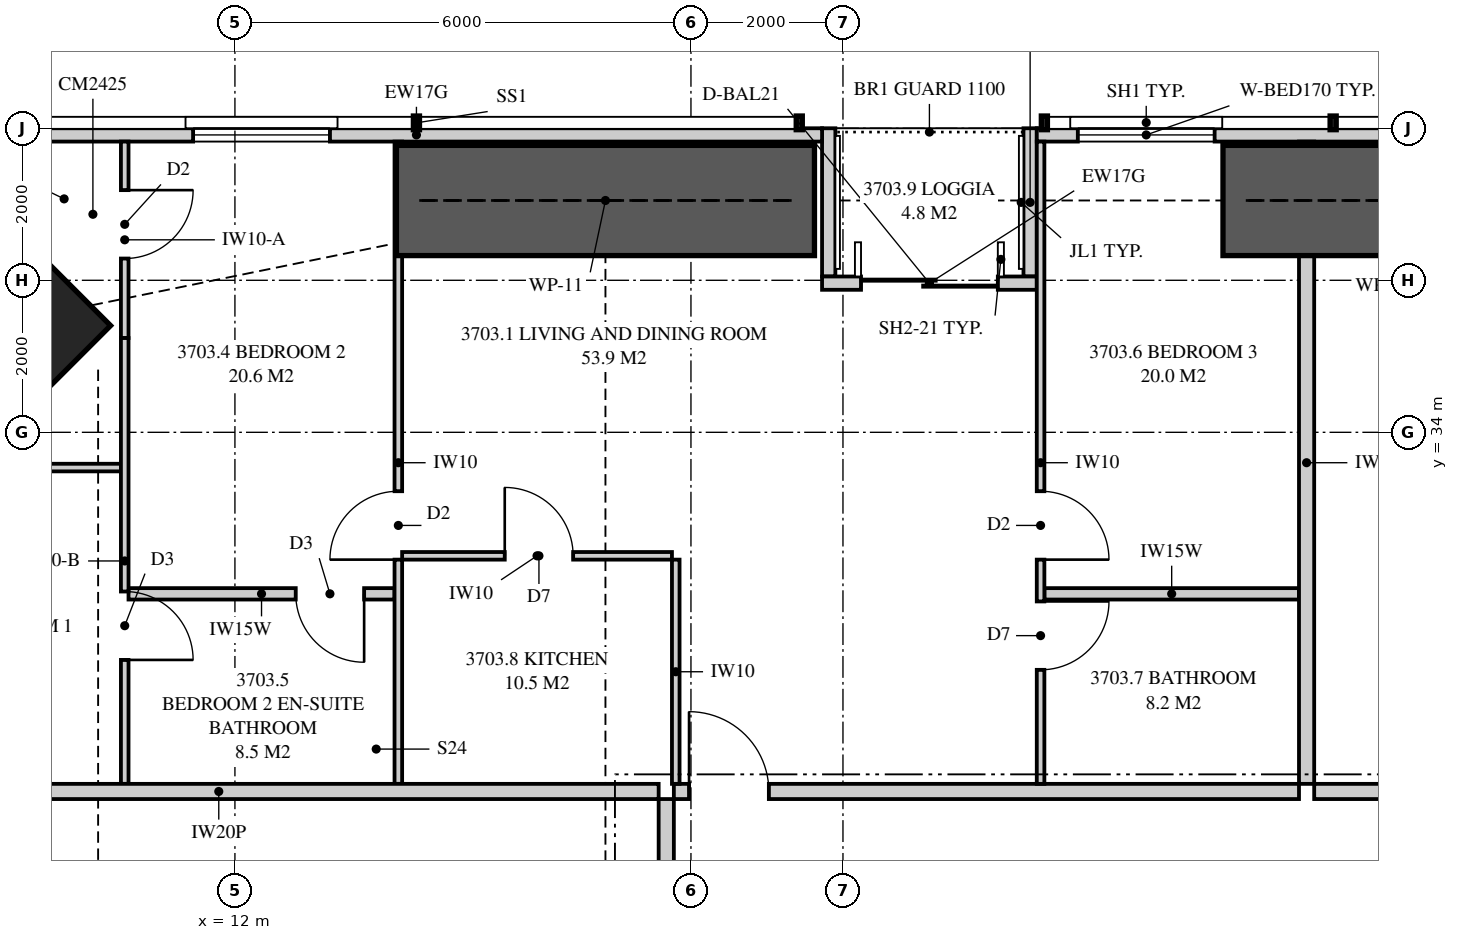
"""IFC4 building model, lengths in metres.
Left out: names, types, materials, properties, quantities, classifications, styles, units other than length and angle.
Written with IfcOpenShell. Run it as: python <this file> out.ifc"""

import sys

from ifc_helpers import new_model, si_unit, direction, frame, frame_2d, origin, origin_2d, place, context, subcontext, project, spatial, polyline, rectangle, outline, extrude, element, fill, save


model = new_model("IFC4")
c1 = context("Model", 3, precision=1e-05, world=origin(), true_north=direction((0.0, 1.0)))
c2 = subcontext(c1, "Body", "Model", "MODEL_VIEW")
j1 = project(units=[si_unit("LENGTHUNIT", "METRE"), si_unit("PLANEANGLEUNIT", "RADIAN")], contexts=[c1])
p1 = place(None, origin())
s1 = spatial("IfcSite", under=j1, at=p1, CompositionType="ELEMENT")
p2 = place(p1, origin())
s2 = spatial("IfcBuilding", under=s1, at=p2, CompositionType="ELEMENT")
p3 = place(p2, frame((0.0, 0.0, 135.0)))
s3 = spatial("IfcBuildingStorey", under=s2, at=p3, CompositionType="ELEMENT", Elevation=135.0)
p4 = place(p3, frame((8.631, 35.369, 0.0), z_axis=(0.0, 0.0, 1.0), x_axis=(0.707106781187, -0.707106781187, 0.0)))
e1 = element("IfcColumn", 1, at=p4, inside=s3, PredefinedType="COLUMN", context=c2, shape_type="SweptSolid", body=[
    extrude(rectangle(XDim=2.4, YDim=2.5, at=origin_2d()), origin(), (0.0, 0.0, 1.0), 3.35),
])
p5 = place(p3, frame((46.449, 37.913, 0.0), z_axis=(0.0, 0.0, 1.0), x_axis=(-1.0, 0.0, 0.0)))
e2 = element("IfcWall", 2, at=p5, inside=s3, PredefinedType="SOLIDWALL", context=c2, shape_type="SweptSolid", body=[
    extrude(outline(polyline([(0.0, 0.0), (23.899, 0.0), (23.899, 2.15), (7.824, 2.15), (7.824, 3.11), (7.666, 3.11), (7.666, 2.15), (7.62, 2.15), (7.62, 3.11), (0.0, 3.11), (0.0, 0.0)])), frame((0.0, 0.087, 0.0), z_axis=(0.0, -1.0, 0.0), x_axis=(1.0, 0.0, 0.0)), (0.0, 0.0, 1.0), 0.175),
])
p6 = place(p5, frame((10.9, 0.0, 0.4)))
e3 = element("IfcOpeningElement", 3, at=p6, cuts=e2, PredefinedType="OPENING", context=c2, shape_type="SweptSolid", body=[
    extrude(rectangle(XDim=1.2, YDim=1.7, at=frame_2d((0.6, 0.85))), frame((0.0, 0.097, 0.0), z_axis=(0.0, -1.0, 0.0), x_axis=(1.0, 0.0, 0.0)), (0.0, 0.0, 1.0), 0.195),
])
p7 = place(p5, frame((21.559, 0.0, 0.4)))
e4 = element("IfcOpeningElement", 4, at=p7, cuts=e2, PredefinedType="OPENING", context=c2, shape_type="SweptSolid", body=[
    extrude(rectangle(XDim=1.8, YDim=1.7, at=frame_2d((0.9, 0.85))), frame((0.0, 0.097, 0.0), z_axis=(0.0, -1.0, 0.0), x_axis=(1.0, 0.0, 0.0)), (0.0, 0.0, 1.0), 0.195),
])
p8 = place(p3, frame((19.725, 37.913, 0.0), z_axis=(0.0, 0.0, 1.0), x_axis=(-1.0, 0.0, 0.0)))
e5 = element("IfcWall", 5, at=p8, inside=s3, PredefinedType="SOLIDWALL", context=c2, shape_type="SweptSolid", body=[
    extrude(outline(polyline([(0.0, 0.0), (10.674, 0.0), (10.674, 3.11), (3.053, 3.11), (3.053, 2.15), (3.008, 2.15), (3.008, 3.11), (2.85, 3.11), (2.85, 2.15), (0.0, 2.15), (0.0, 0.0)])), frame((0.0, 0.087, 0.0), z_axis=(0.0, -1.0, 0.0), x_axis=(1.0, 0.0, 0.0)), (0.0, 0.0, 1.0), 0.175),
])
p9 = place(p8, frame((6.475, 0.0, 0.4)))
e6 = element("IfcOpeningElement", 6, at=p9, cuts=e5, PredefinedType="OPENING", context=c2, shape_type="SweptSolid", body=[
    extrude(rectangle(XDim=1.8, YDim=1.7, at=frame_2d((0.9, 0.85))), frame((0.0, 0.097, 0.0), z_axis=(0.0, -1.0, 0.0), x_axis=(1.0, 0.0, 0.0)), (0.0, 0.0, 1.0), 0.195),
])
p10 = place(p3, frame((22.55, 35.962, 0.0), z_axis=(0.0, 0.0, 1.0), x_axis=(-1.0, 0.0, 0.0)))
e7 = element("IfcWall", 7, at=p10, inside=s3, PredefinedType="SOLIDWALL", context=c2, shape_type="SweptSolid", body=[
    extrude(rectangle(XDim=2.825, YDim=0.175, at=frame_2d((1.413, 0.0))), origin(), (0.0, 0.0, 1.0), 3.11),
])
p11 = place(p10, frame((0.512, 0.0, 0.0)))
e8 = element("IfcOpeningElement", 8, at=p11, cuts=e7, PredefinedType="OPENING", context=c2, shape_type="SweptSolid", body=[
    extrude(rectangle(XDim=1.8, YDim=2.1, at=frame_2d((0.9, 1.05))), frame((0.0, 0.097, 0.0), z_axis=(0.0, -1.0, 0.0), x_axis=(1.0, 0.0, 0.0)), (0.0, 0.0, 1.0), 0.195),
])
for number, where, z_axis, x_axis in (
    (9, (22.462, 38.0, 0.0), (0.0, 0.0, 1.0), (0.0, -1.0, 0.0)),
    (10, (19.812, 38.0, 0.0), (0.0, 0.0, 1.0), (0.0, -1.0, 0.0)),
):
    element("IfcWall", number, at=place(p3, frame(where, z_axis=z_axis, x_axis=x_axis)), inside=s3, PredefinedType="SOLIDWALL", context=c2, shape_type="SweptSolid", body=[
        extrude(outline(polyline([(0.0, 0.0), (1.95, 0.0), (1.95, 3.11), (1.75, 3.11), (1.75, 2.15), (0.15, 2.15), (0.15, 3.11), (0.0, 3.11), (0.0, 0.0)])), frame((0.0, 0.087, 0.0), z_axis=(0.0, -1.0, 0.0), x_axis=(1.0, 0.0, 0.0)), (0.0, 0.0, 1.0), 0.175),
    ])
p12 = place(p3, frame((26.1, 37.825, 0.0), z_axis=(0.0, 0.0, 1.0), x_axis=(0.0, -1.0, 0.0)))
e11 = element("IfcWall", 11, at=p12, inside=s3, PredefinedType="PARTITIONING", context=c2, shape_type="SweptSolid", body=[
    extrude(outline(polyline([(0.529, 2.15), (0.0, 2.15), (0.0, 0.0), (0.529, 0.0), (0.529, 0.376), (1.021, 0.376), (1.021, 0.0), (8.45, 0.0), (8.45, 3.11), (1.685, 3.11), (1.685, 2.15), (1.021, 2.15), (1.021, 1.774), (0.529, 1.774), (0.529, 2.15)])), frame((0.0, 0.1, 0.0), z_axis=(0.0, -1.0, 0.0), x_axis=(1.0, 0.0, 0.0)), (0.0, 0.0, 1.0), 0.2),
])
p13 = place(p3, frame((17.775, 29.275, 0.0), z_axis=(0.0, 0.0, 1.0), x_axis=(1.0, 0.0, 0.0)))
e12 = element("IfcWall", 12, at=p13, inside=s3, PredefinedType="PARTITIONING", context=c2, shape_type="SweptSolid", body=[
    extrude(rectangle(XDim=8.225, YDim=0.2, at=frame_2d((4.113, 0.0))), origin(), (0.0, 0.0, 1.0), 3.11),
])
p14 = place(p13, frame((0.2, 0.0, 0.0)))
e13 = element("IfcOpeningElement", 13, at=p14, cuts=e12, PredefinedType="OPENING", context=c2, shape_type="SweptSolid", body=[
    extrude(rectangle(XDim=1.05, YDim=2.2, at=frame_2d((0.525, 1.1))), frame((0.0, 0.11, 0.0), z_axis=(0.0, -1.0, 0.0), x_axis=(1.0, 0.0, 0.0)), (0.0, 0.0, 1.0), 0.22),
])
p15 = place(p3, frame((10.55, 37.825, 0.0), z_axis=(0.0, 0.0, 1.0), x_axis=(0.0, -1.0, 0.0)))
e14 = element("IfcWall", 14, at=p15, inside=s3, PredefinedType="PARTITIONING", context=c2, shape_type="SweptSolid", body=[
    extrude(outline(polyline([(0.0, 0.0), (2.585, 0.0), (2.585, 2.15), (1.188, 2.15), (1.188, 3.11), (0.0, 3.11), (0.0, 0.0)])), frame((0.0, 0.05, 0.0), z_axis=(0.0, -1.0, 0.0), x_axis=(1.0, 0.0, 0.0)), (0.0, 0.0, 1.0), 0.1),
])
p16 = place(p15, frame((0.639, 0.0, 0.0)))
e15 = element("IfcOpeningElement", 15, at=p16, cuts=e14, PredefinedType="OPENING", context=c2, shape_type="SweptSolid", body=[
    extrude(rectangle(XDim=0.9, YDim=2.1, at=frame_2d((0.45, 1.05))), frame((0.0, 0.06, 0.0), z_axis=(0.0, -1.0, 0.0), x_axis=(1.0, 0.0, 0.0)), (0.0, 0.0, 1.0), 0.12),
])
p17 = place(p3, frame((10.55, 35.24, 0.0), z_axis=(0.0, 0.0, 1.0), x_axis=(0.0, -1.0, 0.0)))
e16 = element("IfcWall", 16, at=p17, inside=s3, PredefinedType="PARTITIONING", context=c2, shape_type="SweptSolid", body=[
    extrude(outline(polyline([(0.0, 0.0), (5.865, 0.0), (5.865, 2.51), (0.358, 2.51), (0.358, 2.15), (0.0, 2.15), (0.0, 0.0)])), frame((0.0, 0.05, 0.0), z_axis=(0.0, -1.0, 0.0), x_axis=(1.0, 0.0, 0.0)), (0.0, 0.0, 1.0), 0.1),
])
p18 = place(p17, frame((3.334, 0.0, 0.0)))
e17 = element("IfcOpeningElement", 17, at=p18, cuts=e16, PredefinedType="OPENING", context=c2, shape_type="SweptSolid", body=[
    extrude(rectangle(XDim=0.9, YDim=2.1, at=frame_2d((0.45, 1.05))), frame((0.0, 0.06, 0.0), z_axis=(0.0, -1.0, 0.0), x_axis=(1.0, 0.0, 0.0)), (0.0, 0.0, 1.0), 0.12),
])
p19 = place(p3, frame((14.15, 37.825, 0.0), z_axis=(0.0, 0.0, 1.0), x_axis=(0.0, -1.0, 0.0)))
e18 = element("IfcWall", 18, at=p19, inside=s3, PredefinedType="PARTITIONING", context=c2, shape_type="SweptSolid", body=[
    extrude(outline(polyline([(0.0, 0.0), (8.45, 0.0), (8.45, 3.11), (2.208, 3.11), (2.208, 2.15), (0.453, 2.15), (0.453, 3.11), (0.0, 3.11), (0.0, 0.0)])), frame((0.0, 0.05, 0.0), z_axis=(0.0, -1.0, 0.0), x_axis=(1.0, 0.0, 0.0)), (0.0, 0.0, 1.0), 0.1),
])
p20 = place(p19, frame((4.6, 0.0, 0.0)))
e19 = element("IfcOpeningElement", 19, at=p20, cuts=e18, PredefinedType="OPENING", context=c2, shape_type="SweptSolid", body=[
    extrude(rectangle(XDim=0.9, YDim=2.1, at=frame_2d((0.45, 1.05))), frame((0.0, 0.06, 0.0), z_axis=(0.0, -1.0, 0.0), x_axis=(1.0, 0.0, 0.0)), (0.0, 0.0, 1.0), 0.12),
])
p21 = place(p3, frame((22.6, 37.825, 0.0), z_axis=(0.0, 0.0, 1.0), x_axis=(0.0, -1.0, 0.0)))
e20 = element("IfcWall", 20, at=p21, inside=s3, PredefinedType="PARTITIONING", context=c2, shape_type="SweptSolid", body=[
    extrude(outline(polyline([(0.0, 0.0), (8.45, 0.0), (8.45, 3.11), (1.635, 3.11), (1.635, 2.15), (0.0, 2.15), (0.0, 3.11), (0.0, 0.0)])), frame((0.0, 0.05, 0.0), z_axis=(0.0, -1.0, 0.0), x_axis=(1.0, 0.0, 0.0)), (0.0, 0.0, 1.0), 0.1),
])
p22 = place(p21, frame((4.6, 0.0, 0.0)))
e21 = element("IfcOpeningElement", 21, at=p22, cuts=e20, PredefinedType="OPENING", context=c2, shape_type="SweptSolid", body=[
    extrude(rectangle(XDim=0.9, YDim=2.1, at=frame_2d((0.45, 1.05))), frame((0.0, 0.06, 0.0), z_axis=(0.0, -1.0, 0.0), x_axis=(1.0, 0.0, 0.0)), (0.0, 0.0, 1.0), 0.12),
])
p23 = place(p21, frame((6.05, 0.0, 0.0)))
e22 = element("IfcOpeningElement", 22, at=p23, cuts=e20, PredefinedType="OPENING", context=c2, shape_type="SweptSolid", body=[
    extrude(rectangle(XDim=0.9, YDim=2.1, at=frame_2d((0.45, 1.05))), frame((0.0, 0.06, 0.0), z_axis=(0.0, -1.0, 0.0), x_axis=(1.0, 0.0, 0.0)), (0.0, 0.0, 1.0), 0.12),
])
p24 = place(p3, frame((6.0, 33.536, 0.0), z_axis=(0.0, 0.0, 1.0), x_axis=(1.0, 0.0, 0.0)))
e23 = element("IfcWall", 23, at=p24, inside=s3, PredefinedType="PARTITIONING", context=c2, shape_type="SweptSolid", body=[
    extrude(outline(polyline([(0.0, 0.0), (4.5, 0.0), (4.5, 3.11), (4.5, 2.51), (3.206, 2.51), (3.206, 2.15), (1.463, 2.15), (1.463, 3.11), (0.0, 3.11), (0.0, 0.0)])), frame((0.0, 0.05, 0.0), z_axis=(0.0, -1.0, 0.0), x_axis=(1.0, 0.0, 0.0)), (0.0, 0.0, 1.0), 0.1),
])
p25 = place(p24, frame((0.7, 0.0, 0.0)))
e24 = element("IfcOpeningElement", 24, at=p25, cuts=e23, PredefinedType="OPENING", context=c2, shape_type="SweptSolid", body=[
    extrude(rectangle(XDim=0.9, YDim=2.1, at=frame_2d((0.45, 1.05))), frame((0.0, 0.06, 0.0), z_axis=(0.0, -1.0, 0.0), x_axis=(1.0, 0.0, 0.0)), (0.0, 0.0, 1.0), 0.12),
])
p26 = place(p3, frame((10.6, 31.875, 0.0), z_axis=(0.0, 0.0, 1.0), x_axis=(1.0, 0.0, 0.0)))
e25 = element("IfcWall", 25, at=p26, inside=s3, PredefinedType="PLUMBINGWALL", context=c2, shape_type="SweptSolid", body=[
    extrude(outline(polyline([(0.0, 0.0), (3.5, 0.0), (3.5, 3.11), (0.885, 3.11), (0.885, 2.51), (0.0, 2.51), (0.0, 3.11), (0.0, 0.0)])), frame((0.0, 0.075, 0.0), z_axis=(0.0, -1.0, 0.0), x_axis=(1.0, 0.0, 0.0)), (0.0, 0.0, 1.0), 0.15),
])
p27 = place(p26, frame((2.2, 0.0, 0.0)))
e26 = element("IfcOpeningElement", 26, at=p27, cuts=e25, PredefinedType="OPENING", context=c2, shape_type="SweptSolid", body=[
    extrude(rectangle(XDim=0.9, YDim=2.1, at=frame_2d((0.45, 1.05))), frame((0.0, 0.085, 0.0), z_axis=(0.0, -1.0, 0.0), x_axis=(1.0, 0.0, 0.0)), (0.0, 0.0, 1.0), 0.17),
])
p28 = place(p3, frame((22.65, 31.875, 0.0), z_axis=(0.0, 0.0, 1.0), x_axis=(1.0, 0.0, 0.0)))
e27 = element("IfcWall", 27, at=p28, inside=s3, PredefinedType="PLUMBINGWALL", context=c2, shape_type="SweptSolid", body=[
    extrude(rectangle(XDim=3.35, YDim=0.15, at=frame_2d((1.675, 0.0))), origin(), (0.0, 0.0, 1.0), 3.11),
])
p29 = place(p3, frame((14.2, 32.375, 0.0), z_axis=(0.0, 0.0, 1.0), x_axis=(1.0, 0.0, 0.0)))
e28 = element("IfcWall", 28, at=p29, inside=s3, PredefinedType="PARTITIONING", context=c2, shape_type="SweptSolid", body=[
    extrude(outline(polyline([(0.0, 0.0), (3.55, 0.0), (3.55, 3.11), (2.962, 3.11), (2.962, 2.541), (2.388, 2.541), (2.388, 3.11), (0.0, 3.11), (0.0, 0.0)])), frame((0.0, 0.05, 0.0), z_axis=(0.0, -1.0, 0.0), x_axis=(1.0, 0.0, 0.0)), (0.0, 0.0, 1.0), 0.1),
])
p30 = place(p29, frame((1.35, 0.0, 0.0)))
e29 = element("IfcOpeningElement", 29, at=p30, cuts=e28, PredefinedType="OPENING", context=c2, shape_type="SweptSolid", body=[
    extrude(rectangle(XDim=0.9, YDim=2.1, at=frame_2d((0.45, 1.05))), frame((0.0, 0.06, 0.0), z_axis=(0.0, -1.0, 0.0), x_axis=(1.0, 0.0, 0.0)), (0.0, 0.0, 1.0), 0.12),
])
p31 = place(p3, frame((17.8, 32.325, 0.0), z_axis=(0.0, 0.0, 1.0), x_axis=(0.0, -1.0, 0.0)))
e30 = element("IfcWall", 30, at=p31, inside=s3, PredefinedType="PARTITIONING", context=c2, shape_type="SweptSolid", body=[
    extrude(rectangle(XDim=2.95, YDim=0.1, at=frame_2d((1.475, 0.0))), origin(), (0.0, 0.0, 1.0), 3.11),
])
p32 = place(p3, frame((26.2, 29.275, 0.0), z_axis=(0.0, 0.0, 1.0), x_axis=(1.0, 0.0, 0.0)))
e31 = element("IfcWall", 31, at=p32, inside=s3, PredefinedType="PARTITIONING", context=c2, shape_type="SweptSolid", body=[
    extrude(outline(polyline([(0.0, 0.0), (7.713, 0.0), (7.712, 3.11), (1.887, 3.11), (1.887, 2.541), (1.213, 2.541), (1.213, 3.11), (0.0, 3.11), (0.0, 0.0)])), frame((0.0, 0.1, 0.0), z_axis=(0.0, -1.0, 0.0), x_axis=(1.0, 0.0, 0.0)), (0.0, 0.0, 1.0), 0.2),
])
p33 = place(p3, frame((6.0, 29.275, 0.0), z_axis=(0.0, 0.0, 1.0), x_axis=(1.0, 0.0, 0.0)))
e32 = element("IfcWall", 32, at=p33, inside=s3, PredefinedType="PARTITIONING", context=c2, shape_type="SweptSolid", body=[
    extrude(outline(polyline([(0.0, 0.0), (11.575, 0.0), (11.575, 3.11), (11.212, 3.11), (11.212, 2.541), (10.538, 2.541), (10.538, 3.11), (5.51, 3.11), (5.51, 2.51), (2.969, 2.51), (2.969, 2.541), (2.565, 2.541), (2.565, 2.15), (0.721, 2.15), (0.721, 3.11), (0.0, 3.11), (0.0, 0.0)])), frame((0.0, 0.1, 0.0), z_axis=(0.0, -1.0, 0.0), x_axis=(1.0, 0.0, 0.0)), (0.0, 0.0, 1.0), 0.2),
])
p34 = place(p3, frame((17.675, 23.45, 0.0), z_axis=(0.0, 0.0, 1.0), x_axis=(0.0, 1.0, 0.0)))
e33 = element("IfcWall", 33, at=p34, inside=s3, PredefinedType="PARTITIONING", context=c2, shape_type="SweptSolid", body=[
    extrude(outline(polyline([(0.0, 0.0), (5.725, 0.0), (5.725, 3.11), (3.312, 3.11), (3.312, 2.541), (2.638, 2.541), (2.638, 3.11), (0.0, 3.11), (0.0, 0.0)])), frame((0.0, 0.1, 0.0), z_axis=(0.0, -1.0, 0.0), x_axis=(1.0, 0.0, 0.0)), (0.0, 0.0, 1.0), 0.2),
])
p35 = place(p34, frame((1.962, 0.0, 0.0)))
e34 = element("IfcOpeningElement", 34, at=p35, cuts=e33, PredefinedType="OPENING", context=c2, shape_type="SweptSolid", body=[
    extrude(rectangle(XDim=1.8, YDim=2.1, at=frame_2d((0.9, 1.05))), frame((0.0, 0.11, 0.0), z_axis=(0.0, -1.0, 0.0), x_axis=(1.0, 0.0, 0.0)), (0.0, 0.0, 1.0), 0.22),
])
for number, where, z_axis, x_axis in (
    (35, (25.0, 37.05, 0.0), (0.0, 0.0, 1.0), (1.0, 0.0, 0.0)),
    (36, (14.125, 37.05, 0.0), (0.0, 0.0, 1.0), (1.0, 0.0, 0.0)),
):
    element("IfcWall", number, at=place(p3, frame(where, z_axis=z_axis, x_axis=x_axis)), inside=s3, PredefinedType="SHEAR", context=c2, shape_type="SweptSolid", body=[
        extrude(rectangle(XDim=5.5, YDim=1.45, at=frame_2d((2.75, 0.0))), origin(), (0.0, 0.0, 1.0), 3.35),
    ])
p36 = place(p7, origin())
e37 = element("IfcWindow", 37, at=p36, inside=s3, PartitioningType="SINGLE_PANEL", PredefinedType="WINDOW", context=c2, shape_type="SweptSolid", body=[
    extrude(rectangle(XDim=1.8, YDim=1.7, at=frame_2d((0.9, 0.85))), frame((0.0, 0.03, 0.0), z_axis=(0.0, -1.0, 0.0), x_axis=(1.0, 0.0, 0.0)), (0.0, 0.0, 1.0), 0.06),
])
fill(e4, e37)
p37 = place(p11, origin())
e38 = element("IfcDoor", 38, at=p37, inside=s3, OperationType="SLIDING_TO_LEFT", PredefinedType="DOOR", context=c2, shape_type="SweptSolid", body=[
    extrude(rectangle(XDim=1.8, YDim=2.1, at=frame_2d((0.9, 1.05))), frame((0.0, 0.025, 0.0), z_axis=(0.0, -1.0, 0.0), x_axis=(1.0, 0.0, 0.0)), (0.0, 0.0, 1.0), 0.05),
])
fill(e8, e38)
p38 = place(p9, origin())
e39 = element("IfcWindow", 39, at=p38, inside=s3, PartitioningType="SINGLE_PANEL", PredefinedType="WINDOW", context=c2, shape_type="SweptSolid", body=[
    extrude(rectangle(XDim=1.8, YDim=1.7, at=frame_2d((0.9, 0.85))), frame((0.0, 0.03, 0.0), z_axis=(0.0, -1.0, 0.0), x_axis=(1.0, 0.0, 0.0)), (0.0, 0.0, 1.0), 0.06),
])
fill(e6, e39)
p39 = place(p14, origin())
e40 = element("IfcDoor", 40, at=p39, inside=s3, OperationType="SINGLE_SWING_LEFT", PredefinedType="DOOR", context=c2, shape_type="SweptSolid", body=[
    extrude(rectangle(XDim=1.05, YDim=2.2, at=frame_2d((0.525, 1.1))), frame((0.0, 0.025, 0.0), z_axis=(0.0, -1.0, 0.0), x_axis=(1.0, 0.0, 0.0)), (0.0, 0.0, 1.0), 0.05),
])
fill(e13, e40)
p40 = place(p16, origin())
e41 = element("IfcDoor", 41, at=p40, inside=s3, OperationType="SINGLE_SWING_LEFT", PredefinedType="DOOR", context=c2, shape_type="SweptSolid", body=[
    extrude(rectangle(XDim=0.9, YDim=2.1, at=frame_2d((0.45, 1.05))), frame((0.0, 0.025, 0.0), z_axis=(0.0, -1.0, 0.0), x_axis=(1.0, 0.0, 0.0)), (0.0, 0.0, 1.0), 0.05),
])
fill(e15, e41)
p41 = place(p20, frame((0.9, 0.0, 0.0), z_axis=(0.0, 0.0, 1.0), x_axis=(-1.0, 0.0, 0.0)))
e42 = element("IfcDoor", 42, at=p41, inside=s3, OperationType="SINGLE_SWING_LEFT", PredefinedType="DOOR", context=c2, shape_type="SweptSolid", body=[
    extrude(rectangle(XDim=0.9, YDim=2.1, at=frame_2d((0.45, 1.05))), frame((0.0, 0.025, 0.0), z_axis=(0.0, -1.0, 0.0), x_axis=(1.0, 0.0, 0.0)), (0.0, 0.0, 1.0), 0.05),
])
fill(e19, e42)
p42 = place(p27, frame((0.9, 0.0, 0.0), z_axis=(0.0, 0.0, 1.0), x_axis=(-1.0, 0.0, 0.0)))
e43 = element("IfcDoor", 43, at=p42, inside=s3, OperationType="SINGLE_SWING_LEFT", PredefinedType="DOOR", context=c2, shape_type="SweptSolid", body=[
    extrude(rectangle(XDim=0.9, YDim=2.1, at=frame_2d((0.45, 1.05))), frame((0.0, 0.025, 0.0), z_axis=(0.0, -1.0, 0.0), x_axis=(1.0, 0.0, 0.0)), (0.0, 0.0, 1.0), 0.05),
])
fill(e26, e43)
p43 = place(p22, origin())
e44 = element("IfcDoor", 44, at=p43, inside=s3, OperationType="SINGLE_SWING_RIGHT", PredefinedType="DOOR", context=c2, shape_type="SweptSolid", body=[
    extrude(rectangle(XDim=0.9, YDim=2.1, at=frame_2d((0.45, 1.05))), frame((0.0, 0.025, 0.0), z_axis=(0.0, -1.0, 0.0), x_axis=(1.0, 0.0, 0.0)), (0.0, 0.0, 1.0), 0.05),
])
fill(e21, e44)
p44 = place(p23, origin())
e45 = element("IfcDoor", 45, at=p44, inside=s3, OperationType="SINGLE_SWING_LEFT", PredefinedType="DOOR", context=c2, shape_type="SweptSolid", body=[
    extrude(rectangle(XDim=0.9, YDim=2.1, at=frame_2d((0.45, 1.05))), frame((0.0, 0.025, 0.0), z_axis=(0.0, -1.0, 0.0), x_axis=(1.0, 0.0, 0.0)), (0.0, 0.0, 1.0), 0.05),
])
fill(e22, e45)
p45 = place(p18, origin())
e46 = element("IfcDoor", 46, at=p45, inside=s3, OperationType="SINGLE_SWING_RIGHT", PredefinedType="DOOR", context=c2, shape_type="SweptSolid", body=[
    extrude(rectangle(XDim=0.9, YDim=2.1, at=frame_2d((0.45, 1.05))), frame((0.0, 0.025, 0.0), z_axis=(0.0, -1.0, 0.0), x_axis=(1.0, 0.0, 0.0)), (0.0, 0.0, 1.0), 0.05),
])
fill(e17, e46)
p46 = place(p30, origin())
e47 = element("IfcDoor", 47, at=p46, inside=s3, OperationType="SINGLE_SWING_LEFT", PredefinedType="DOOR", context=c2, shape_type="SweptSolid", body=[
    extrude(rectangle(XDim=0.9, YDim=2.1, at=frame_2d((0.45, 1.05))), frame((0.0, 0.025, 0.0), z_axis=(0.0, -1.0, 0.0), x_axis=(1.0, 0.0, 0.0)), (0.0, 0.0, 1.0), 0.05),
])
fill(e29, e47)
save(model, sys.argv[1])
